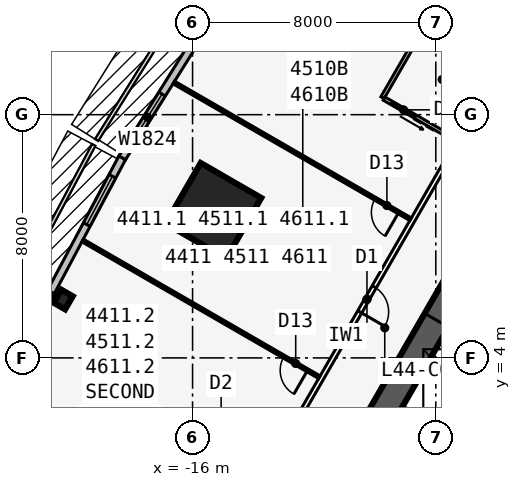
"""IFC4 building model, lengths in metres.
Left out: names, types, materials, properties, quantities, classifications, styles, units other than length and angle.
Written with IfcOpenShell. Run it as: python <this file> out.ifc"""

import sys

from ifc_helpers import new_model, si_unit, direction, frame, frame_2d, origin, origin_2d, place, context, subcontext, project, spatial, rectangle, i_section, extrude, element, fill, save


model = new_model("IFC4")
c1 = context("Model", 3, precision=1e-05, world=origin(), true_north=direction((0.0, 1.0)))
c2 = subcontext(c1, "Body", "Model", "MODEL_VIEW")
j1 = project(units=[si_unit("LENGTHUNIT", "METRE"), si_unit("PLANEANGLEUNIT", "RADIAN")], contexts=[c1])
p1 = place(None, origin())
s1 = spatial("IfcSite", under=j1, at=p1, CompositionType="ELEMENT")
p2 = place(p1, origin())
s2 = spatial("IfcBuilding", under=s1, at=p2, CompositionType="ELEMENT")
p3 = place(p2, frame((0.0, 0.0, 165.7)))
s3 = spatial("IfcBuildingStorey", under=s2, at=p3, CompositionType="ELEMENT", Elevation=165.7)
p4 = place(p3, frame((0.0, 19.052, 0.0), z_axis=(0.0, 0.0, 1.0), x_axis=(-0.499999749417, -0.866025548458, 0.0)))
e1 = element("IfcWall", 1, at=p4, inside=s3, PredefinedType="SHEAR", context=c2, shape_type="SweptSolid", body=[
    extrude(rectangle(XDim=33.0, YDim=0.9, at=frame_2d((16.5, 0.0))), origin(), (0.0, 0.0, 1.0), 3.4),
])
p5 = place(p4, frame((14.15, 0.0, 0.0)))
e2 = element("IfcOpeningElement", 2, at=p5, cuts=e1, PredefinedType="OPENING", context=c2, shape_type="SweptSolid", body=[
    extrude(rectangle(XDim=1.8, YDim=2.13, at=frame_2d((0.9, 1.065))), frame((0.0, 0.46, 0.0), z_axis=(0.0, -1.0, 0.0), x_axis=(1.0, 0.0, 0.0)), (0.0, 0.0, 1.0), 0.92),
])
p6 = place(p4, frame((12.6, 0.0, 0.0)))
e3 = element("IfcOpeningElement", 3, at=p6, cuts=e1, PredefinedType="OPENING", context=c2, shape_type="SweptSolid", body=[
    extrude(rectangle(XDim=1.0, YDim=2.13, at=frame_2d((0.5, 1.065))), frame((0.0, 0.46, 0.0), z_axis=(0.0, -1.0, 0.0), x_axis=(1.0, 0.0, 0.0)), (0.0, 0.0, 1.0), 0.92),
])
p7 = place(p3, frame((-4.929, 3.365, 0.0), z_axis=(0.0, 0.0, 1.0), x_axis=(-0.499991433582, -0.866030349552, 0.0)))
e4 = element("IfcWall", 4, at=p7, inside=s3, PredefinedType="SOLIDWALL", context=c2, shape_type="SweptSolid", body=[
    extrude(rectangle(XDim=10.633, YDim=0.25, at=frame_2d((5.316, 0.0))), origin(), (0.0, 0.0, 1.0), 3.235),
])
p8 = place(p7, frame((9.164, 0.0, 0.0)))
e5 = element("IfcOpeningElement", 5, at=p8, cuts=e4, PredefinedType="OPENING", context=c2, shape_type="SweptSolid", body=[
    extrude(rectangle(XDim=0.9, YDim=2.13, at=frame_2d((0.45, 1.065))), frame((0.0, 0.135, 0.0), z_axis=(0.0, -1.0, 0.0), x_axis=(1.0, 0.0, 0.0)), (0.0, 0.0, 1.0), 0.27),
])
p9 = place(p3, frame((-6.429, 0.767, 0.0), z_axis=(0.0, 0.0, 1.0), x_axis=(-0.866022959057, 0.500004234368, 0.0)))
e6 = element("IfcWall", 6, at=p9, inside=s3, PredefinedType="SOLIDWALL", context=c2, shape_type="SweptSolid", body=[
    extrude(rectangle(XDim=3.125, YDim=0.2, at=frame_2d((1.562, 0.0))), origin(), (0.0, 0.0, 1.0), 3.235),
])
p10 = place(p3, frame((-20.254, 5.92, 0.0), z_axis=(0.0, 0.0, 1.0), x_axis=(-0.866025403784, 0.5, 0.0)))
e7 = element("IfcColumn", 7, at=p10, inside=s3, PredefinedType="COLUMN", context=c2, shape_type="SweptSolid", body=[
    extrude(i_section(OverallWidth=0.432, OverallDepth=0.498, WebThickness=0.056, FlangeThickness=0.089, at=origin_2d()), origin(), (0.0, 0.0, 1.0), 3.4),
])
p11 = place(p3, frame((-15.312, 8.84, 0.0), z_axis=(0.0, 0.0, 1.0), x_axis=(-0.866025403784, 0.5, 0.0)))
e8 = element("IfcColumn", 8, at=p11, inside=s3, PredefinedType="COLUMN", context=c2, shape_type="SweptSolid", body=[
    extrude(rectangle(XDim=2.3, YDim=2.3, at=origin_2d()), origin(), (0.0, 0.0, 1.0), 3.4),
])
p12 = place(p3, frame((-15.667, 14.814, 0.0), z_axis=(0.0, 0.0, 1.0), x_axis=(-0.529990167382, -0.84800378683, 0.0)))
e9 = element("IfcWall", 9, at=p12, inside=s3, PredefinedType="STANDARD", context=c2, shape_type="SweptSolid", body=[
    extrude(rectangle(XDim=5.003, YDim=0.25, at=frame_2d((2.501, 0.0))), origin(), (0.0, 0.0, 1.0), 3.235),
])
p13 = place(p12, frame((2.519, 0.0, 0.45)))
e10 = element("IfcOpeningElement", 10, at=p13, cuts=e9, PredefinedType="OPENING", context=c2, shape_type="SweptSolid", body=[
    extrude(rectangle(XDim=1.8, YDim=2.4, at=frame_2d((0.9, 1.2))), frame((0.0, 0.135, 0.0), z_axis=(0.0, -1.0, 0.0), x_axis=(1.0, 0.0, 0.0)), (0.0, 0.0, 1.0), 0.27),
])
p14 = place(p3, frame((-18.314, 10.579, 0.0), z_axis=(0.0, 0.0, 1.0), x_axis=(-0.469404966864, -0.882982999317, 0.0)))
e11 = element("IfcWall", 11, at=p14, inside=s3, PredefinedType="STANDARD", context=c2, shape_type="SweptSolid", body=[
    extrude(rectangle(XDim=5.003, YDim=0.25, at=frame_2d((2.501, 0.0))), origin(), (0.0, 0.0, 1.0), 3.235),
])
p15 = place(p14, frame((0.684, 0.0, 0.45)))
e12 = element("IfcOpeningElement", 12, at=p15, cuts=e11, PredefinedType="OPENING", context=c2, shape_type="SweptSolid", body=[
    extrude(rectangle(XDim=1.8, YDim=2.4, at=frame_2d((0.9, 1.2))), frame((0.0, 0.135, 0.0), z_axis=(0.0, -1.0, 0.0), x_axis=(1.0, 0.0, 0.0)), (0.0, 0.0, 1.0), 0.27),
])
p16 = place(p3, frame((-20.659, 6.169, 0.0), z_axis=(0.0, 0.0, 1.0), x_axis=(-0.406832200364, -0.913502906808, 0.0)))
e13 = element("IfcWall", 13, at=p16, inside=s3, PredefinedType="STANDARD", context=c2, shape_type="SweptSolid", body=[
    extrude(rectangle(XDim=5.028, YDim=0.25, at=frame_2d((2.514, 0.0))), origin(), (0.0, 0.0, 1.0), 3.235),
])
p17 = place(p16, frame((0.61, 0.0, 0.45)))
e14 = element("IfcOpeningElement", 14, at=p17, cuts=e13, PredefinedType="OPENING", context=c2, shape_type="SweptSolid", body=[
    extrude(rectangle(XDim=3.0, YDim=2.4, at=frame_2d((1.5, 1.2))), frame((0.0, 0.135, 0.0), z_axis=(0.0, -1.0, 0.0), x_axis=(1.0, 0.0, 0.0)), (0.0, 0.0, 1.0), 0.27),
])
p18 = place(p3, frame((-0.5, 22.836, 0.0), z_axis=(0.0, 0.0, 1.0), x_axis=(-0.500001677587, -0.866024435227, 0.0)))
e15 = element("IfcWall", 15, at=p18, inside=s3, PredefinedType="PARTITIONING", context=c2, shape_type="SweptSolid", body=[
    extrude(rectangle(XDim=39.054, YDim=0.15, at=frame_2d((19.527, 0.0))), origin(), (0.0, 0.0, 1.0), 3.235),
])
p19 = place(p18, frame((1.558, 0.0, 0.0)))
e16 = element("IfcOpeningElement", 16, at=p19, cuts=e15, PredefinedType="OPENING", context=c2, shape_type="SweptSolid", body=[
    extrude(rectangle(XDim=0.95, YDim=2.13, at=frame_2d((0.475, 1.065))), frame((0.0, 0.085, 0.0), z_axis=(0.0, -1.0, 0.0), x_axis=(1.0, 0.0, 0.0)), (0.0, 0.0, 1.0), 0.17),
])
p20 = place(p18, frame((19.052, 0.0, 0.0)))
e17 = element("IfcOpeningElement", 17, at=p20, cuts=e15, PredefinedType="OPENING", context=c2, shape_type="SweptSolid", body=[
    extrude(rectangle(XDim=0.95, YDim=2.13, at=frame_2d((0.475, 1.065))), frame((0.0, 0.085, 0.0), z_axis=(0.0, -1.0, 0.0), x_axis=(1.0, 0.0, 0.0)), (0.0, 0.0, 1.0), 0.17),
])
p21 = place(p18, frame((31.752, 0.0, 0.0)))
e18 = element("IfcOpeningElement", 18, at=p21, cuts=e15, PredefinedType="OPENING", context=c2, shape_type="SweptSolid", body=[
    extrude(rectangle(XDim=0.95, YDim=2.13, at=frame_2d((0.475, 1.065))), frame((0.0, 0.085, 0.0), z_axis=(0.0, -1.0, 0.0), x_axis=(1.0, 0.0, 0.0)), (0.0, 0.0, 1.0), 0.17),
])
p22 = place(p18, frame((37.752, 0.0, 0.0)))
e19 = element("IfcOpeningElement", 19, at=p22, cuts=e15, PredefinedType="OPENING", context=c2, shape_type="SweptSolid", body=[
    extrude(rectangle(XDim=0.95, YDim=2.13, at=frame_2d((0.475, 1.065))), frame((0.0, 0.085, 0.0), z_axis=(0.0, -1.0, 0.0), x_axis=(1.0, 0.0, 0.0)), (0.0, 0.0, 1.0), 0.17),
])
p23 = place(p3, frame((-5.829, 13.757, 0.0), z_axis=(0.0, 0.0, 1.0), x_axis=(-0.866011529155, 0.500024030793, 0.0)))
e20 = element("IfcWall", 20, at=p23, inside=s3, PredefinedType="PARTITIONING", context=c2, shape_type="SweptSolid", body=[
    extrude(rectangle(XDim=8.502, YDim=0.15, at=frame_2d((4.251, 0.0))), origin(), (0.0, 0.0, 1.0), 3.235),
])
p24 = place(p3, frame((-8.829, 8.561, 0.0), z_axis=(0.0, 0.0, 1.0), x_axis=(-0.866021034389, 0.500007567939, 0.0)))
e21 = element("IfcWall", 21, at=p24, inside=s3, PredefinedType="PARTITIONING", context=c2, shape_type="SweptSolid", body=[
    extrude(rectangle(XDim=8.993, YDim=0.1, at=frame_2d((4.497, 0.0))), origin(), (0.0, 0.0, 1.0), 3.235),
])
p25 = place(p24, frame((0.45, 0.0, 0.0)))
e22 = element("IfcOpeningElement", 22, at=p25, cuts=e21, PredefinedType="OPENING", context=c2, shape_type="SweptSolid", body=[
    extrude(rectangle(XDim=0.9, YDim=2.13, at=frame_2d((0.45, 1.065))), frame((0.0, 0.06, 0.0), z_axis=(0.0, -1.0, 0.0), x_axis=(1.0, 0.0, 0.0)), (0.0, 0.0, 1.0), 0.12),
])
p26 = place(p3, frame((-11.829, 3.365, 0.0), z_axis=(0.0, 0.0, 1.0), x_axis=(-0.866009279501, 0.500027927039, 0.0)))
e23 = element("IfcWall", 23, at=p26, inside=s3, PredefinedType="PARTITIONING", context=c2, shape_type="SweptSolid", body=[
    extrude(rectangle(XDim=8.994, YDim=0.1, at=frame_2d((4.497, 0.0))), origin(), (0.0, 0.0, 1.0), 3.235),
])
p27 = place(p26, frame((0.45, 0.0, 0.0)))
e24 = element("IfcOpeningElement", 24, at=p27, cuts=e23, PredefinedType="OPENING", context=c2, shape_type="SweptSolid", body=[
    extrude(rectangle(XDim=0.9, YDim=2.13, at=frame_2d((0.45, 1.065))), frame((0.0, 0.06, 0.0), z_axis=(0.0, -1.0, 0.0), x_axis=(1.0, 0.0, 0.0)), (0.0, 0.0, 1.0), 0.12),
])
p28 = place(p3, frame((-14.829, -1.831, 0.0), z_axis=(0.0, 0.0, 1.0), x_axis=(-0.866023962952, 0.500002495586, 0.0)))
e25 = element("IfcWall", 25, at=p28, inside=s3, PredefinedType="PARTITIONING", context=c2, shape_type="SweptSolid", body=[
    extrude(rectangle(XDim=8.502, YDim=0.15, at=frame_2d((4.251, 0.0))), origin(), (0.0, 0.0, 1.0), 3.235),
])
p29 = place(p3, frame((-8.253, 15.157, 0.0), z_axis=(0.0, 0.0, 1.0), x_axis=(-0.499990139034, -0.866031096941, 0.0)))
e26 = element("IfcWall", 26, at=p29, inside=s3, PredefinedType="PLUMBINGWALL", context=c2, shape_type="SweptSolid", body=[
    extrude(rectangle(XDim=3.0, YDim=0.12, at=frame_2d((1.5, 0.0))), origin(), (0.0, 0.0, 1.0), 3.235),
])
p30 = place(p3, frame((-7.329, 11.159, 0.0), z_axis=(0.0, 0.0, 1.0), x_axis=(-0.865997131366, 0.500048966069, 0.0)))
e27 = element("IfcWall", 27, at=p30, inside=s3, PredefinedType="PLUMBINGWALL", context=c2, shape_type="SweptSolid", body=[
    extrude(rectangle(XDim=2.74, YDim=0.12, at=frame_2d((1.37, 0.0))), origin(), (0.0, 0.0, 1.0), 3.235),
])
p31 = place(p30, frame((1.55, 0.0, 0.0)))
e28 = element("IfcOpeningElement", 28, at=p31, cuts=e27, PredefinedType="OPENING", context=c2, shape_type="SweptSolid", body=[
    extrude(rectangle(XDim=0.9, YDim=2.13, at=frame_2d((0.45, 1.065))), frame((0.0, 0.07, 0.0), z_axis=(0.0, -1.0, 0.0), x_axis=(1.0, 0.0, 0.0)), (0.0, 0.0, 1.0), 0.14),
])
p32 = place(p13, origin())
e29 = element("IfcWindow", 29, at=p32, inside=s3, PartitioningType="SINGLE_PANEL", PredefinedType="WINDOW", context=c2, shape_type="SweptSolid", body=[
    extrude(rectangle(XDim=1.8, YDim=2.4, at=frame_2d((0.9, 1.2))), frame((0.0, 0.03, 0.0), z_axis=(0.0, -1.0, 0.0), x_axis=(1.0, 0.0, 0.0)), (0.0, 0.0, 1.0), 0.06),
])
fill(e10, e29)
p33 = place(p15, origin())
e30 = element("IfcWindow", 30, at=p33, inside=s3, PartitioningType="SINGLE_PANEL", PredefinedType="WINDOW", context=c2, shape_type="SweptSolid", body=[
    extrude(rectangle(XDim=1.8, YDim=2.4, at=frame_2d((0.9, 1.2))), frame((0.0, 0.03, 0.0), z_axis=(0.0, -1.0, 0.0), x_axis=(1.0, 0.0, 0.0)), (0.0, 0.0, 1.0), 0.06),
])
fill(e12, e30)
p34 = place(p25, origin())
e31 = element("IfcDoor", 31, at=p34, inside=s3, OperationType="SINGLE_SWING_LEFT", PredefinedType="DOOR", context=c2, shape_type="SweptSolid", body=[
    extrude(rectangle(XDim=0.9, YDim=2.13, at=frame_2d((0.45, 1.065))), frame((0.0, 0.025, 0.0), z_axis=(0.0, -1.0, 0.0), x_axis=(1.0, 0.0, 0.0)), (0.0, 0.0, 1.0), 0.05),
])
fill(e22, e31)
p35 = place(p27, origin())
e32 = element("IfcDoor", 32, at=p35, inside=s3, OperationType="SINGLE_SWING_LEFT", PredefinedType="DOOR", context=c2, shape_type="SweptSolid", body=[
    extrude(rectangle(XDim=0.9, YDim=2.13, at=frame_2d((0.45, 1.065))), frame((0.0, 0.025, 0.0), z_axis=(0.0, -1.0, 0.0), x_axis=(1.0, 0.0, 0.0)), (0.0, 0.0, 1.0), 0.05),
])
fill(e24, e32)
p36 = place(p31, origin())
e33 = element("IfcDoor", 33, at=p36, inside=s3, OperationType="SLIDING_TO_LEFT", PredefinedType="DOOR", context=c2, shape_type="SweptSolid", body=[
    extrude(rectangle(XDim=0.9, YDim=2.13, at=frame_2d((0.45, 1.065))), frame((0.0, 0.025, 0.0), z_axis=(0.0, -1.0, 0.0), x_axis=(1.0, 0.0, 0.0)), (0.0, 0.0, 1.0), 0.05),
])
fill(e28, e33)
p37 = place(p20, origin())
e34 = element("IfcDoor", 34, at=p37, inside=s3, OperationType="SINGLE_SWING_RIGHT", PredefinedType="DOOR", context=c2, shape_type="SweptSolid", body=[
    extrude(rectangle(XDim=0.95, YDim=2.13, at=frame_2d((0.475, 1.065))), frame((0.0, 0.025, 0.0), z_axis=(0.0, -1.0, 0.0), x_axis=(1.0, 0.0, 0.0)), (0.0, 0.0, 1.0), 0.05),
])
fill(e17, e34)
p38 = place(p5, origin())
e35 = element("IfcDoor", 35, at=p38, inside=s3, OperationType="DOUBLE_DOOR_SINGLE_SWING", PredefinedType="DOOR", context=c2, shape_type="SweptSolid", body=[
    extrude(rectangle(XDim=1.8, YDim=2.13, at=frame_2d((0.9, 1.065))), frame((0.0, 0.025, 0.0), z_axis=(0.0, -1.0, 0.0), x_axis=(1.0, 0.0, 0.0)), (0.0, 0.0, 1.0), 0.05),
])
fill(e2, e35)
save(model, sys.argv[1])
